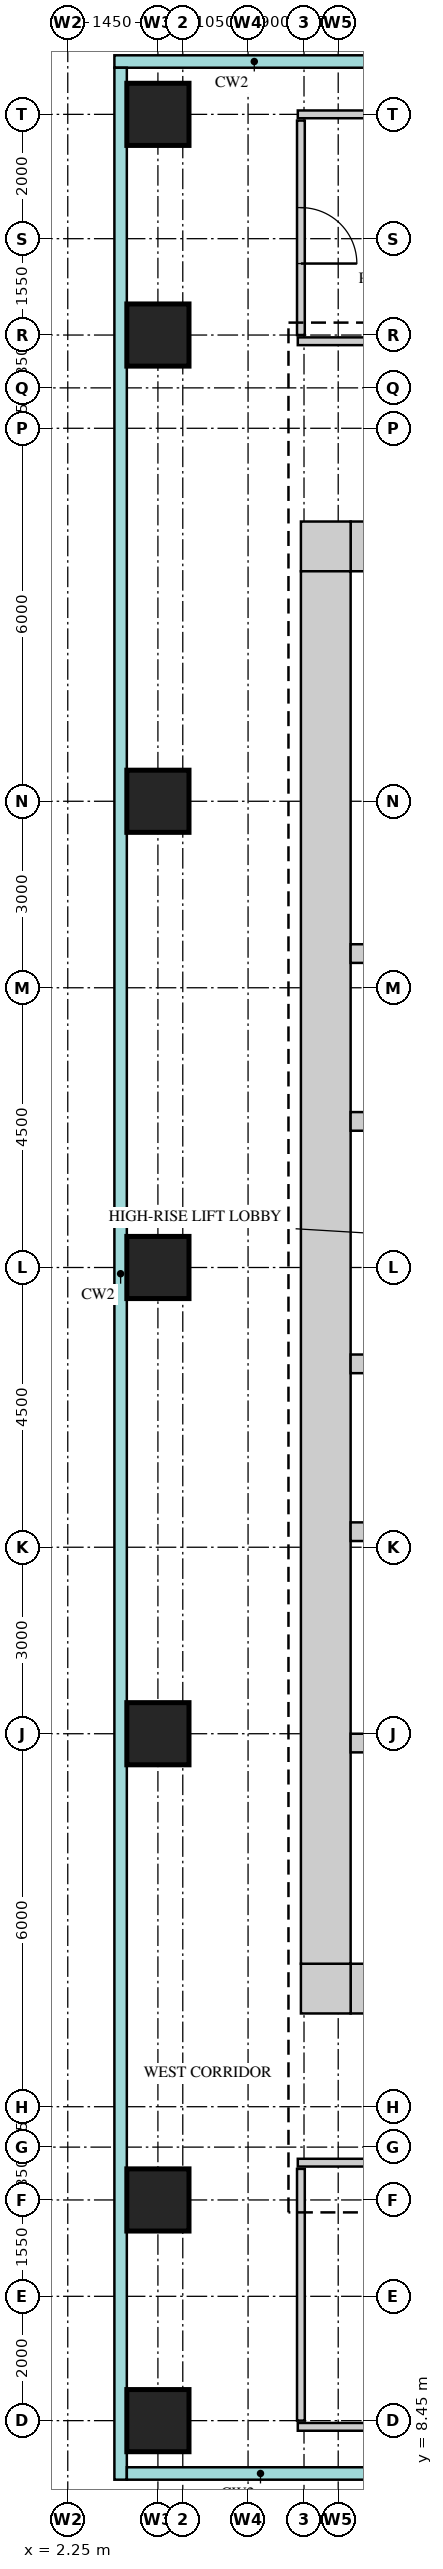
"""IFC4 building model, lengths in metres.
Left out: names, types, materials, properties, quantities, classifications, styles, units other than length and angle.
Written with IfcOpenShell. Run it as: python <this file> out.ifc"""

import sys

from ifc_helpers import new_model, si_unit, direction, frame, frame_2d, origin, origin_2d, place, context, subcontext, project, spatial, rectangle, extrude, source, transform, mapped, element, fill, save


model = new_model("IFC4")
c1 = context("Model", 3, precision=1e-05, world=origin(), true_north=direction((0.0, 1.0)))
c2 = subcontext(c1, "Body", "Model", "MODEL_VIEW")
j1 = project(units=[si_unit("LENGTHUNIT", "METRE"), si_unit("PLANEANGLEUNIT", "RADIAN")], contexts=[c1])
p1 = place(None, origin())
s1 = spatial("IfcSite", under=j1, at=p1, CompositionType="ELEMENT")
p2 = place(p1, origin())
s2 = spatial("IfcBuilding", under=s1, at=p2, CompositionType="ELEMENT")
p3 = place(p2, frame((0.0, 0.0, 180.7)))
s3 = spatial("IfcBuildingStorey", under=s2, at=p3, CompositionType="ELEMENT", Elevation=180.7)
m1 = source(origin(), c2, "Body", "SweptSolid", [
    extrude(rectangle(XDim=13.4, YDim=0.8, at=frame_2d((6.7, 0.0))), origin(), (0.0, 0.0, 1.0), 3.75),
])
p4 = place(p3, frame((6.8, 38.6, 0.0), z_axis=(0.0, 0.0, 1.0), x_axis=(1.0, 0.0, 0.0)))
e1 = element("IfcWall", 1, at=p4, inside=s3, PredefinedType="SHEAR", context=c2, shape_type="MappedRepresentation", body=[
    mapped(m1, transform((0.0, 0.0, 0.0))),
])
m2 = source(origin(), c2, "Body", "SweptSolid", [
    extrude(rectangle(XDim=0.9, YDim=2.1, at=frame_2d((0.45, 1.05))), frame((0.0, 0.41, 0.0), z_axis=(0.0, -1.0, 0.0), x_axis=(1.0, 0.0, 0.0)), (0.0, 0.0, 1.0), 0.82),
])
p5 = place(p4, frame((1.25, 0.0, 0.0)))
e2 = element("IfcOpeningElement", 2, at=p5, cuts=e1, PredefinedType="OPENING", context=c2, shape_type="MappedRepresentation", body=[
    mapped(m2, transform((0.0, 0.0, 0.0))),
])
p6 = place(p4, frame((4.65, 0.0, 0.0)))
e3 = element("IfcOpeningElement", 3, at=p6, cuts=e1, PredefinedType="OPENING", context=c2, shape_type="MappedRepresentation", body=[
    mapped(m2, transform((0.0, 0.0, 0.0))),
])
m3 = source(origin(), c2, "Body", "SweptSolid", [
    extrude(rectangle(XDim=1.0, YDim=2.1, at=frame_2d((0.5, 1.05))), frame((0.0, 0.41, 0.0), z_axis=(0.0, -1.0, 0.0), x_axis=(1.0, 0.0, 0.0)), (0.0, 0.0, 1.0), 0.82),
])
p7 = place(p4, frame((8.0, 0.0, 0.0)))
e4 = element("IfcOpeningElement", 4, at=p7, cuts=e1, PredefinedType="OPENING", context=c2, shape_type="MappedRepresentation", body=[
    mapped(m3, transform((0.0, 0.0, 0.0))),
])
p8 = place(p4, frame((11.35, 0.0, 0.0)))
e5 = element("IfcOpeningElement", 5, at=p8, cuts=e1, PredefinedType="OPENING", context=c2, shape_type="MappedRepresentation", body=[
    mapped(m2, transform((0.0, 0.0, 0.0))),
])
m4 = source(origin(), c2, "Body", "SweptSolid", [
    extrude(rectangle(XDim=0.8, YDim=0.8, at=frame_2d((0.4, 0.0))), origin(), (0.0, 0.0, 1.0), 3.75),
])
p9 = place(p3, frame((6.0, 38.6, 0.0), z_axis=(0.0, 0.0, 1.0), x_axis=(1.0, 0.0, 0.0)))
e6 = element("IfcWall", 6, at=p9, inside=s3, PredefinedType="SHEAR", context=c2, shape_type="MappedRepresentation", body=[
    mapped(m4, transform((0.0, 0.0, 0.0))),
])
p10 = place(p3, frame((6.8, 15.4, 0.0), z_axis=(0.0, 0.0, 1.0), x_axis=(1.0, 0.0, 0.0)))
e7 = element("IfcWall", 7, at=p10, inside=s3, PredefinedType="SHEAR", context=c2, shape_type="MappedRepresentation", body=[
    mapped(m1, transform((0.0, 0.0, 0.0))),
])
m5 = source(origin(), c2, "Body", "SweptSolid", [
    extrude(rectangle(XDim=1.2, YDim=2.1, at=frame_2d((0.6, 1.05))), frame((0.0, 0.41, 0.0), z_axis=(0.0, -1.0, 0.0), x_axis=(1.0, 0.0, 0.0)), (0.0, 0.0, 1.0), 0.82),
])
p11 = place(p10, frame((5.4, 0.0, 0.0)))
e8 = element("IfcOpeningElement", 8, at=p11, cuts=e7, PredefinedType="OPENING", context=c2, shape_type="MappedRepresentation", body=[
    mapped(m5, transform((0.0, 0.0, 0.0))),
])
p12 = place(p10, frame((2.05, 0.0, 0.0)))
e9 = element("IfcOpeningElement", 9, at=p12, cuts=e7, PredefinedType="OPENING", context=c2, shape_type="MappedRepresentation", body=[
    mapped(m5, transform((0.0, 0.0, 0.0))),
])
p13 = place(p10, frame((7.9, 0.0, 0.0)))
e10 = element("IfcOpeningElement", 10, at=p13, cuts=e7, PredefinedType="OPENING", context=c2, shape_type="MappedRepresentation", body=[
    mapped(m3, transform((0.0, 0.0, 0.0))),
])
p14 = place(p3, frame((6.0, 15.4, 0.0), z_axis=(0.0, 0.0, 1.0), x_axis=(1.0, 0.0, 0.0)))
e11 = element("IfcWall", 11, at=p14, inside=s3, PredefinedType="SHEAR", context=c2, shape_type="MappedRepresentation", body=[
    mapped(m4, transform((0.0, 0.0, 0.0))),
])
m6 = source(origin(), c2, "Body", "SweptSolid", [
    extrude(rectangle(XDim=22.4, YDim=0.8, at=frame_2d((11.2, 0.0))), origin(), (0.0, 0.0, 1.0), 3.75),
])
p15 = place(p3, frame((6.4, 15.8, 0.0), z_axis=(0.0, 0.0, 1.0), x_axis=(0.0, 1.0, 0.0)))
e12 = element("IfcWall", 12, at=p15, inside=s3, PredefinedType="SHEAR", context=c2, shape_type="MappedRepresentation", body=[
    mapped(m6, transform((0.0, 0.0, 0.0))),
])
m7 = source(origin(), c2, "Body", "SweptSolid", [
    extrude(rectangle(XDim=13.4, YDim=0.3, at=frame_2d((6.7, 0.0))), origin(), (0.0, 0.0, 1.0), 3.75),
])
p16 = place(p3, frame((6.8, 22.75, 0.0), z_axis=(0.0, 0.0, 1.0), x_axis=(1.0, 0.0, 0.0)))
e13 = element("IfcWall", 13, at=p16, inside=s3, PredefinedType="STANDARD", context=c2, shape_type="MappedRepresentation", body=[
    mapped(m7, transform((0.0, 0.0, 0.0))),
])
m8 = source(origin(), c2, "Body", "SweptSolid", [
    extrude(rectangle(XDim=9.275, YDim=0.3, at=frame_2d((4.637, 0.0))), origin(), (0.0, 0.0, 1.0), 3.75),
])
p17 = place(p3, frame((6.8, 19.35, 0.0), z_axis=(0.0, 0.0, 1.0), x_axis=(1.0, 0.0, 0.0)))
e14 = element("IfcWall", 14, at=p17, inside=s3, PredefinedType="STANDARD", context=c2, shape_type="MappedRepresentation", body=[
    mapped(m8, transform((0.0, 0.0, 0.0))),
])
m9 = source(origin(), c2, "Body", "SweptSolid", [
    extrude(rectangle(XDim=1.2, YDim=2.1, at=frame_2d((0.6, 1.05))), frame((0.0, 0.16, 0.0), z_axis=(0.0, -1.0, 0.0), x_axis=(1.0, 0.0, 0.0)), (0.0, 0.0, 1.0), 0.32),
])
p18 = place(p17, frame((0.85, 0.0, 0.0)))
e15 = element("IfcOpeningElement", 15, at=p18, cuts=e14, PredefinedType="OPENING", context=c2, shape_type="MappedRepresentation", body=[
    mapped(m9, transform((0.0, 0.0, 0.0))),
])
p19 = place(p17, frame((3.2, 0.0, 0.0)))
e16 = element("IfcOpeningElement", 16, at=p19, cuts=e14, PredefinedType="OPENING", context=c2, shape_type="MappedRepresentation", body=[
    mapped(m9, transform((0.0, 0.0, 0.0))),
])
p20 = place(p17, frame((5.45, 0.0, 0.0)))
e17 = element("IfcOpeningElement", 17, at=p20, cuts=e14, PredefinedType="OPENING", context=c2, shape_type="MappedRepresentation", body=[
    mapped(m9, transform((0.0, 0.0, 0.0))),
])
p21 = place(p17, frame((7.6, 0.0, 0.0)))
e18 = element("IfcOpeningElement", 18, at=p21, cuts=e14, PredefinedType="OPENING", context=c2, shape_type="MappedRepresentation", body=[
    mapped(m9, transform((0.0, 0.0, 0.0))),
])
p22 = place(p3, frame((6.8, 32.05, 0.0), z_axis=(0.0, 0.0, 1.0), x_axis=(1.0, 0.0, 0.0)))
e19 = element("IfcWall", 19, at=p22, inside=s3, PredefinedType="STANDARD", context=c2, shape_type="MappedRepresentation", body=[
    mapped(m7, transform((0.0, 0.0, 0.0))),
])
p23 = place(p3, frame((6.8, 29.35, 0.0), z_axis=(0.0, 0.0, 1.0), x_axis=(1.0, 0.0, 0.0)))
e20 = element("IfcWall", 20, at=p23, inside=s3, PredefinedType="STANDARD", context=c2, shape_type="MappedRepresentation", body=[
    mapped(m7, transform((0.0, 0.0, 0.0))),
])
p24 = place(p23, frame((0.95, 0.0, 0.0)))
e21 = element("IfcOpeningElement", 21, at=p24, cuts=e20, PredefinedType="OPENING", context=c2, shape_type="MappedRepresentation", body=[
    mapped(m9, transform((0.0, 0.0, 0.0))),
])
p25 = place(p23, frame((3.5, 0.0, 0.0)))
e22 = element("IfcOpeningElement", 22, at=p25, cuts=e20, PredefinedType="OPENING", context=c2, shape_type="MappedRepresentation", body=[
    mapped(m9, transform((0.0, 0.0, 0.0))),
])
p26 = place(p23, frame((6.05, 0.0, 0.0)))
e23 = element("IfcOpeningElement", 23, at=p26, cuts=e20, PredefinedType="OPENING", context=c2, shape_type="MappedRepresentation", body=[
    mapped(m9, transform((0.0, 0.0, 0.0))),
])
p27 = place(p23, frame((8.6, 0.0, 0.0)))
e24 = element("IfcOpeningElement", 24, at=p27, cuts=e20, PredefinedType="OPENING", context=c2, shape_type="MappedRepresentation", body=[
    mapped(m9, transform((0.0, 0.0, 0.0))),
])
p28 = place(p23, frame((11.15, 0.0, 0.0)))
e25 = element("IfcOpeningElement", 25, at=p28, cuts=e20, PredefinedType="OPENING", context=c2, shape_type="MappedRepresentation", body=[
    mapped(m9, transform((0.0, 0.0, 0.0))),
])
p29 = place(p3, frame((6.8, 25.45, 0.0), z_axis=(0.0, 0.0, 1.0), x_axis=(1.0, 0.0, 0.0)))
e26 = element("IfcWall", 26, at=p29, inside=s3, PredefinedType="STANDARD", context=c2, shape_type="MappedRepresentation", body=[
    mapped(m7, transform((0.0, 0.0, 0.0))),
])
p30 = place(p29, frame((0.95, 0.0, 0.0)))
e27 = element("IfcOpeningElement", 27, at=p30, cuts=e26, PredefinedType="OPENING", context=c2, shape_type="MappedRepresentation", body=[
    mapped(m9, transform((0.0, 0.0, 0.0))),
])
p31 = place(p29, frame((3.5, 0.0, 0.0)))
e28 = element("IfcOpeningElement", 28, at=p31, cuts=e26, PredefinedType="OPENING", context=c2, shape_type="MappedRepresentation", body=[
    mapped(m9, transform((0.0, 0.0, 0.0))),
])
p32 = place(p29, frame((6.05, 0.0, 0.0)))
e29 = element("IfcOpeningElement", 29, at=p32, cuts=e26, PredefinedType="OPENING", context=c2, shape_type="MappedRepresentation", body=[
    mapped(m9, transform((0.0, 0.0, 0.0))),
])
p33 = place(p29, frame((8.6, 0.0, 0.0)))
e30 = element("IfcOpeningElement", 30, at=p33, cuts=e26, PredefinedType="OPENING", context=c2, shape_type="MappedRepresentation", body=[
    mapped(m9, transform((0.0, 0.0, 0.0))),
])
p34 = place(p29, frame((11.15, 0.0, 0.0)))
e31 = element("IfcOpeningElement", 31, at=p34, cuts=e26, PredefinedType="OPENING", context=c2, shape_type="MappedRepresentation", body=[
    mapped(m9, transform((0.0, 0.0, 0.0))),
])
m10 = source(origin(), c2, "Body", "SweptSolid", [
    extrude(rectangle(XDim=1.0, YDim=1.0, at=origin_2d()), origin(), (0.0, 0.0, 1.0), 3.75),
])
for number, where, z_axis, x_axis in (
    (32, (3.7, 8.45, 0.0), (0.0, 0.0, 1.0), (1.0, 0.0, 0.0)),
    (33, (3.7, 12.0, 0.0), (0.0, 0.0, 1.0), (1.0, 0.0, 0.0)),
    (34, (3.7, 19.5, 0.0), (0.0, 0.0, 1.0), (1.0, 0.0, 0.0)),
    (35, (3.7, 27.0, 0.0), (0.0, 0.0, 1.0), (1.0, 0.0, 0.0)),
    (36, (3.7, 34.5, 0.0), (0.0, 0.0, 1.0), (1.0, 0.0, 0.0)),
    (37, (3.7, 42.0, 0.0), (0.0, 0.0, 1.0), (1.0, 0.0, 0.0)),
    (38, (3.7, 45.55, 0.0), (0.0, 0.0, 1.0), (1.0, 0.0, 0.0)),
):
    element("IfcColumn", number, at=place(p3, frame(where, z_axis=z_axis, x_axis=x_axis)), inside=s3, PredefinedType="COLUMN", context=c2, shape_type="MappedRepresentation", body=[
        mapped(m10, transform((0.0, 0.0, 0.0))),
    ])
m11 = source(origin(), c2, "Body", "SweptSolid", [
    extrude(rectangle(XDim=7.95, YDim=0.125, at=frame_2d((3.975, 0.0))), origin(), (0.0, 0.0, 1.0), 3.25),
])
p35 = place(p3, frame((5.95, 8.35, 0.0), z_axis=(0.0, 0.0, 1.0), x_axis=(1.0, 0.0, 0.0)))
e39 = element("IfcWall", 39, at=p35, inside=s3, PredefinedType="PARTITIONING", context=c2, shape_type="MappedRepresentation", body=[
    mapped(m11, transform((0.0, 0.0, 0.0))),
])
m12 = source(origin(), c2, "Body", "SweptSolid", [
    extrude(rectangle(XDim=0.9, YDim=2.1, at=frame_2d((0.45, 1.05))), frame((0.0, 0.073, 0.0), z_axis=(0.0, -1.0, 0.0), x_axis=(1.0, 0.0, 0.0)), (0.0, 0.0, 1.0), 0.145),
])
p36 = place(p35, frame((3.8, 0.0, 0.0)))
e40 = element("IfcOpeningElement", 40, at=p36, cuts=e39, PredefinedType="OPENING", context=c2, shape_type="MappedRepresentation", body=[
    mapped(m12, transform((0.0, 0.0, 0.0))),
])
m13 = source(origin(), c2, "Body", "SweptSolid", [
    extrude(rectangle(XDim=4.05, YDim=0.125, at=frame_2d((2.025, 0.0))), origin(), (0.0, 0.0, 1.0), 3.8),
])
p37 = place(p3, frame((6.0, 8.45, 0.0), z_axis=(0.0, 0.0, 1.0), x_axis=(0.0, 1.0, 0.0)))
e41 = element("IfcWall", 41, at=p37, inside=s3, PredefinedType="PARTITIONING", context=c2, shape_type="MappedRepresentation", body=[
    mapped(m13, transform((0.0, 0.0, 0.0))),
])
m14 = source(origin(), c2, "Body", "SweptSolid", [
    extrude(rectangle(XDim=8.0, YDim=0.125, at=frame_2d((4.0, 0.0))), origin(), (0.0, 0.0, 1.0), 3.8),
])
p38 = place(p3, frame((5.95, 12.6, 0.0), z_axis=(0.0, 0.0, 1.0), x_axis=(1.0, 0.0, 0.0)))
e42 = element("IfcWall", 42, at=p38, inside=s3, PredefinedType="PARTITIONING", context=c2, shape_type="MappedRepresentation", body=[
    mapped(m14, transform((0.0, 0.0, 0.0))),
])
m15 = source(origin(), c2, "Body", "SweptSolid", [
    extrude(rectangle(XDim=7.95, YDim=0.125, at=frame_2d((3.975, 0.0))), origin(), (0.0, 0.0, 1.0), 3.8),
])
p39 = place(p3, frame((5.95, 41.9, 0.0), z_axis=(0.0, 0.0, 1.0), x_axis=(1.0, 0.0, 0.0)))
e43 = element("IfcWall", 43, at=p39, inside=s3, PredefinedType="PARTITIONING", context=c2, shape_type="MappedRepresentation", body=[
    mapped(m15, transform((0.0, 0.0, 0.0))),
])
p40 = place(p39, frame((5.05, 0.0, 0.0)))
e44 = element("IfcOpeningElement", 44, at=p40, cuts=e43, PredefinedType="OPENING", context=c2, shape_type="MappedRepresentation", body=[
    mapped(m12, transform((0.0, 0.0, 0.0))),
])
m16 = source(origin(), c2, "Body", "SweptSolid", [
    extrude(rectangle(XDim=3.45, YDim=0.125, at=frame_2d((1.725, 0.0))), origin(), (0.0, 0.0, 1.0), 3.8),
])
p41 = place(p3, frame((6.0, 42.0, 0.0), z_axis=(0.0, 0.0, 1.0), x_axis=(0.0, 1.0, 0.0)))
e45 = element("IfcWall", 45, at=p41, inside=s3, PredefinedType="PARTITIONING", context=c2, shape_type="MappedRepresentation", body=[
    mapped(m16, transform((0.0, 0.0, 0.0))),
])
p42 = place(p41, frame((1.15, 0.0, 0.0)))
e46 = element("IfcOpeningElement", 46, at=p42, cuts=e45, PredefinedType="OPENING", context=c2, shape_type="MappedRepresentation", body=[
    mapped(m12, transform((0.0, 0.0, 0.0))),
])
p43 = place(p3, frame((5.95, 45.55, 0.0), z_axis=(0.0, 0.0, 1.0), x_axis=(1.0, 0.0, 0.0)))
e47 = element("IfcWall", 47, at=p43, inside=s3, PredefinedType="PARTITIONING", context=c2, shape_type="MappedRepresentation", body=[
    mapped(m11, transform((0.0, 0.0, 0.0))),
])
m17 = source(origin(), c2, "Body", "SweptSolid", [
    extrude(rectangle(XDim=0.9, YDim=2.1, at=frame_2d((0.45, 1.05))), frame((0.0, 0.025, 0.0), z_axis=(0.0, -1.0, 0.0), x_axis=(1.0, 0.0, 0.0)), (0.0, 0.0, 1.0), 0.05),
])
p44 = place(p42, origin())
e48 = element("IfcDoor", 48, at=p44, inside=s3, OperationType="SINGLE_SWING_LEFT", PredefinedType="DOOR", context=c2, shape_type="MappedRepresentation", body=[
    mapped(m17, transform((0.0, 0.0, 0.0))),
])
fill(e46, e48)
save(model, sys.argv[1])
